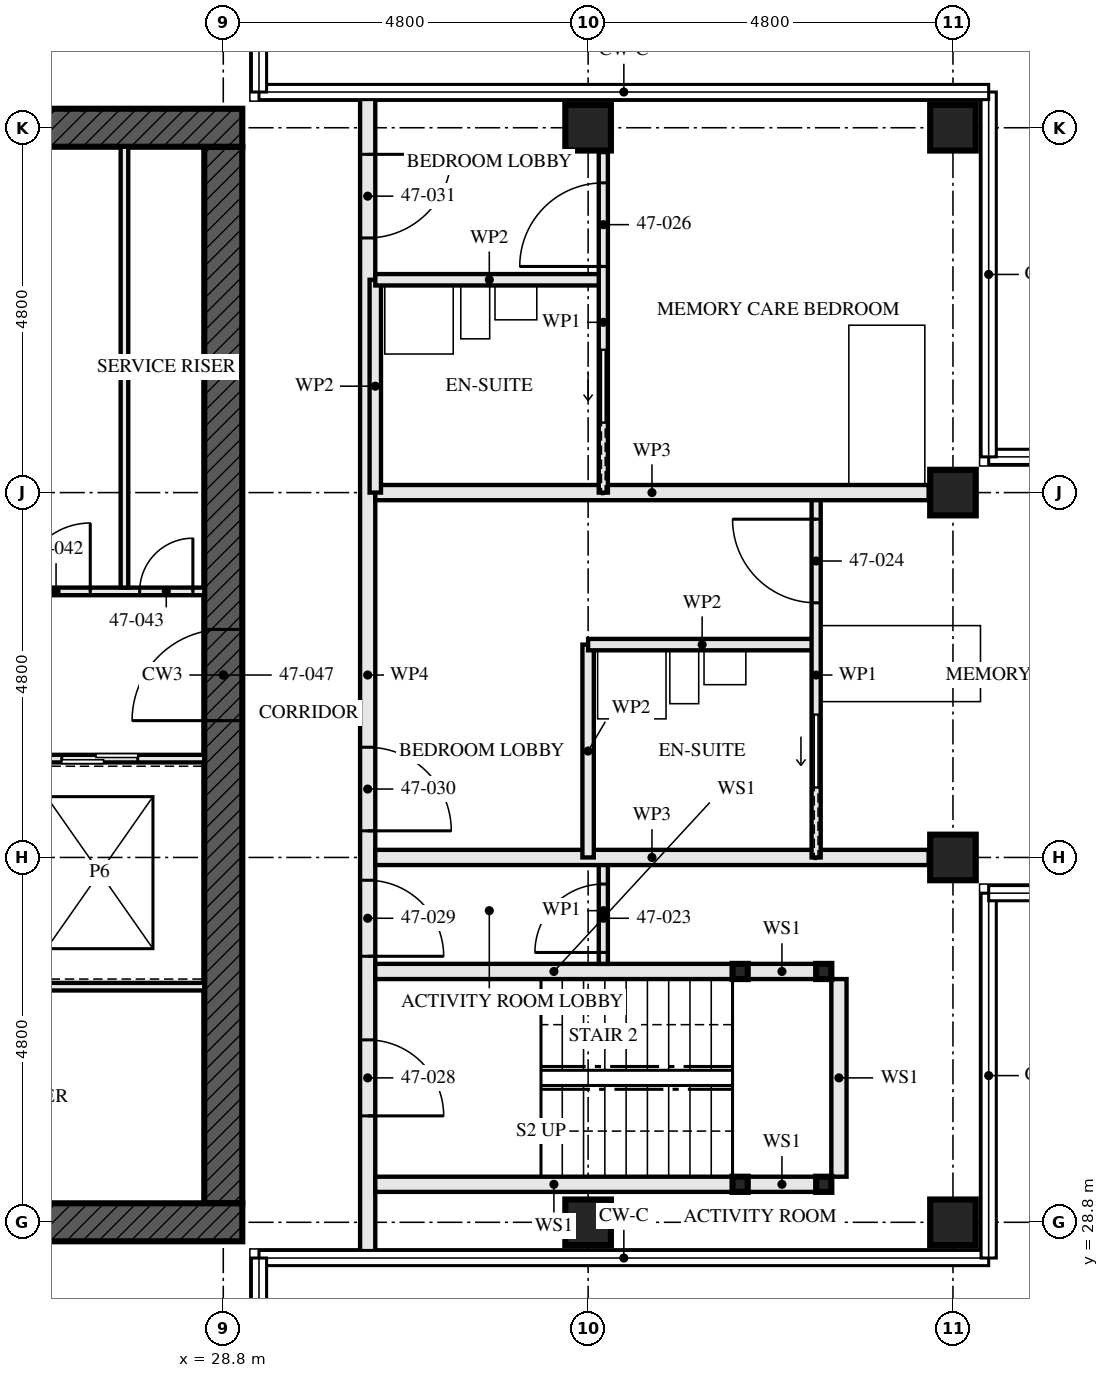
"""IFC4 building model, lengths in metres.
Left out: names, types, materials, properties, quantities, classifications, styles, units other than length and angle.
Written with IfcOpenShell. Run it as: python <this file> out.ifc"""

import sys

from ifc_helpers import new_model, si_unit, direction, frame, frame_2d, origin, origin_2d, place, context, subcontext, project, spatial, rectangle, hollow_rectangle, extrude, element, fill, save


model = new_model("IFC4")
c1 = context("Model", 3, precision=1e-05, world=origin(), true_north=direction((0.0, 1.0)))
c2 = subcontext(c1, "Body", "Model", "MODEL_VIEW")
j1 = project(units=[si_unit("LENGTHUNIT", "METRE"), si_unit("PLANEANGLEUNIT", "RADIAN")], contexts=[c1])
p1 = place(None, origin())
s1 = spatial("IfcSite", under=j1, at=p1, CompositionType="ELEMENT")
p2 = place(p1, origin())
s2 = spatial("IfcBuilding", under=s1, at=p2, CompositionType="ELEMENT")
p3 = place(p2, frame((0.0, 0.0, 172.5)))
s3 = spatial("IfcBuildingStorey", under=s2, at=p3, CompositionType="ELEMENT", Elevation=172.5)
for number, where, z_axis, x_axis in (
    (1, (33.6, 28.8, 0.0), (0.0, 0.0, 1.0), (0.0, 1.0, 0.0)),
    (2, (33.6, 43.2, 0.0), (0.0, 0.0, 1.0), (0.0, 1.0, 0.0)),
    (3, (38.4, 28.8, 0.0), (0.0, 0.0, 1.0), (0.0, 1.0, 0.0)),
    (4, (38.4, 33.6, 0.0), (0.0, 0.0, 1.0), (0.0, 1.0, 0.0)),
    (5, (38.4, 38.4, 0.0), (0.0, 0.0, 1.0), (0.0, 1.0, 0.0)),
    (6, (38.4, 43.2, 0.0), (0.0, 0.0, 1.0), (0.0, 1.0, 0.0)),
):
    element("IfcColumn", number, at=place(p3, frame(where, z_axis=z_axis, x_axis=x_axis)), inside=s3, PredefinedType="COLUMN", context=c2, shape_type="SweptSolid", body=[
        extrude(hollow_rectangle(XDim=0.6, YDim=0.6, WallThickness=0.08, at=origin_2d()), origin(), (0.0, 0.0, 1.0), 3.5),
    ])
p4 = place(p3, frame((14.15, 28.8, -0.17), z_axis=(0.0, 0.0, 1.0), x_axis=(1.0, 0.0, 0.0)))
e7 = element("IfcWall", 7, at=p4, inside=s3, PredefinedType="SHEAR", context=c2, shape_type="SweptSolid", body=[
    extrude(rectangle(XDim=14.9, YDim=0.5, at=frame_2d((7.45, 0.0))), origin(), (0.0, 0.0, 1.0), 3.5),
])
p5 = place(p4, frame((6.85, 0.0, 0.17)))
e8 = element("IfcOpeningElement", 8, at=p5, cuts=e7, PredefinedType="OPENING", context=c2, shape_type="SweptSolid", body=[
    extrude(rectangle(XDim=1.2, YDim=2.1, at=frame_2d((0.6, 1.05))), frame((0.0, 0.26, 0.0), z_axis=(0.0, -1.0, 0.0), x_axis=(1.0, 0.0, 0.0)), (0.0, 0.0, 1.0), 0.521),
])
p6 = place(p3, frame((29.05, 43.2, -0.17), z_axis=(0.0, 0.0, 1.0), x_axis=(-1.0, 0.0, 0.0)))
e9 = element("IfcWall", 9, at=p6, inside=s3, PredefinedType="SHEAR", context=c2, shape_type="SweptSolid", body=[
    extrude(rectangle(XDim=14.9, YDim=0.5, at=frame_2d((7.45, 0.0))), origin(), (0.0, 0.0, 1.0), 3.5),
])
p7 = place(p6, frame((6.85, 0.0, 0.17)))
e10 = element("IfcOpeningElement", 10, at=p7, cuts=e9, PredefinedType="OPENING", context=c2, shape_type="SweptSolid", body=[
    extrude(rectangle(XDim=1.2, YDim=2.1, at=frame_2d((0.6, 1.05))), frame((0.0, 0.26, 0.0), z_axis=(0.0, -1.0, 0.0), x_axis=(1.0, 0.0, 0.0)), (0.0, 0.0, 1.0), 0.521),
])
p8 = place(p3, frame((28.8, 29.05, -0.17), z_axis=(0.0, 0.0, 1.0), x_axis=(0.0, 1.0, 0.0)))
e11 = element("IfcWall", 11, at=p8, inside=s3, PredefinedType="SHEAR", context=c2, shape_type="SweptSolid", body=[
    extrude(rectangle(XDim=13.9, YDim=0.5, at=frame_2d((6.95, 0.0))), origin(), (0.0, 0.0, 1.0), 3.5),
])
p9 = place(p8, frame((6.35, 0.0, 0.17)))
e12 = element("IfcOpeningElement", 12, at=p9, cuts=e11, PredefinedType="OPENING", context=c2, shape_type="SweptSolid", body=[
    extrude(rectangle(XDim=1.2, YDim=2.1, at=frame_2d((0.6, 1.05))), frame((0.0, 0.26, 0.0), z_axis=(0.0, -1.0, 0.0), x_axis=(1.0, 0.0, 0.0)), (0.0, 0.0, 1.0), 0.521),
])
for number, where, z_axis, x_axis in (
    (13, (36.7, 29.3, 0.0), (0.0, 0.0, 1.0), (1.0, 0.0, 0.0)),
    (14, (36.7, 32.1, 0.0), (0.0, 0.0, 1.0), (1.0, 0.0, 0.0)),
    (15, (35.6, 29.3, 0.0), (0.0, 0.0, 1.0), (1.0, 0.0, 0.0)),
    (16, (35.6, 32.1, 0.0), (0.0, 0.0, 1.0), (1.0, 0.0, 0.0)),
):
    element("IfcColumn", number, at=place(p3, frame(where, z_axis=z_axis, x_axis=x_axis)), inside=s3, PredefinedType="COLUMN", context=c2, shape_type="SweptSolid", body=[
        extrude(hollow_rectangle(XDim=0.2, YDim=0.2, WallThickness=0.008, at=origin_2d()), origin(), (0.0, 0.0, 1.0), 3.33),
    ])
p10 = place(p3, frame((36.6, 29.3, 0.0), z_axis=(0.0, 0.0, 1.0), x_axis=(-1.0, 0.0, 0.0)))
e17 = element("IfcWall", 17, at=p10, inside=s3, PredefinedType="SOLIDWALL", context=c2, shape_type="SweptSolid", body=[
    extrude(rectangle(XDim=0.9, YDim=0.2, at=frame_2d((0.45, 0.0))), origin(), (0.0, 0.0, 1.0), 2.99),
])
p11 = place(p3, frame((35.5, 29.3, 0.0), z_axis=(0.0, 0.0, 1.0), x_axis=(-1.0, 0.0, 0.0)))
e18 = element("IfcWall", 18, at=p11, inside=s3, PredefinedType="SOLIDWALL", context=c2, shape_type="SweptSolid", body=[
    extrude(rectangle(XDim=4.7, YDim=0.2, at=frame_2d((2.35, 0.0))), origin(), (0.0, 0.0, 1.0), 2.99),
])
p12 = place(p3, frame((36.6, 32.1, 0.0), z_axis=(0.0, 0.0, 1.0), x_axis=(-1.0, 0.0, 0.0)))
e19 = element("IfcWall", 19, at=p12, inside=s3, PredefinedType="SOLIDWALL", context=c2, shape_type="SweptSolid", body=[
    extrude(rectangle(XDim=0.9, YDim=0.2, at=frame_2d((0.45, 0.0))), origin(), (0.0, 0.0, 1.0), 2.99),
])
p13 = place(p3, frame((35.5, 32.1, 0.0), z_axis=(0.0, 0.0, 1.0), x_axis=(-1.0, 0.0, 0.0)))
e20 = element("IfcWall", 20, at=p13, inside=s3, PredefinedType="SOLIDWALL", context=c2, shape_type="SweptSolid", body=[
    extrude(rectangle(XDim=4.7, YDim=0.2, at=frame_2d((2.35, 0.0))), origin(), (0.0, 0.0, 1.0), 2.99),
])
p14 = place(p3, frame((36.9, 29.4, 0.0), z_axis=(0.0, 0.0, 1.0), x_axis=(0.0, 1.0, 0.0)))
e21 = element("IfcWall", 21, at=p14, inside=s3, PredefinedType="SOLIDWALL", context=c2, shape_type="SweptSolid", body=[
    extrude(rectangle(XDim=2.6, YDim=0.2, at=frame_2d((1.3, 0.0))), origin(), (0.0, 0.0, 1.0), 3.33),
])
p15 = place(p3, frame((33.8, 32.2, 0.0), z_axis=(0.0, 0.0, 1.0), x_axis=(0.0, 1.0, 0.0)))
e22 = element("IfcWall", 22, at=p15, inside=s3, PredefinedType="PARTITIONING", context=c2, shape_type="SweptSolid", body=[
    extrude(rectangle(XDim=1.4, YDim=0.12, at=frame_2d((0.7, 0.0))), origin(), (0.0, 0.0, 1.0), 3.33),
])
p16 = place(p15, frame((0.15, 0.0, 0.0)))
e23 = element("IfcOpeningElement", 23, at=p16, cuts=e22, PredefinedType="OPENING", context=c2, shape_type="SweptSolid", body=[
    extrude(rectangle(XDim=0.9, YDim=2.1, at=frame_2d((0.45, 1.05))), frame((0.0, 0.071, 0.0), z_axis=(0.0, -1.0, 0.0), x_axis=(1.0, 0.0, 0.0)), (0.0, 0.0, 1.0), 0.141),
])
p17 = place(p3, frame((38.08, 33.6, 0.0), z_axis=(0.0, 0.0, 1.0), x_axis=(-1.0, 0.0, 0.0)))
e24 = element("IfcWall", 24, at=p17, inside=s3, PredefinedType="PARTITIONING", context=c2, shape_type="SweptSolid", body=[
    extrude(rectangle(XDim=7.28, YDim=0.2, at=frame_2d((3.64, 0.0))), origin(), (0.0, 0.0, 1.0), 2.55),
])
p18 = place(p3, frame((36.6, 36.4, 0.0), z_axis=(0.0, 0.0, 1.0), x_axis=(-1.0, 0.0, 0.0)))
e25 = element("IfcWall", 25, at=p18, inside=s3, PredefinedType="PARTITIONING", context=c2, shape_type="SweptSolid", body=[
    extrude(rectangle(XDim=3.0, YDim=0.15, at=frame_2d((1.5, 0.0))), origin(), (0.0, 0.0, 1.0), 3.33),
])
p19 = place(p3, frame((33.6, 33.6, 0.0), z_axis=(0.0, 0.0, 1.0), x_axis=(0.0, 1.0, 0.0)))
e26 = element("IfcWall", 26, at=p19, inside=s3, PredefinedType="PARTITIONING", context=c2, shape_type="SweptSolid", body=[
    extrude(rectangle(XDim=2.8, YDim=0.15, at=frame_2d((1.4, 0.0))), origin(), (0.0, 0.0, 1.0), 3.33),
])
p20 = place(p3, frame((36.6, 33.6, 0.0), z_axis=(0.0, 0.0, 1.0), x_axis=(0.0, 1.0, 0.0)))
e27 = element("IfcWall", 27, at=p20, inside=s3, PredefinedType="PARTITIONING", context=c2, shape_type="SweptSolid", body=[
    extrude(rectangle(XDim=4.8, YDim=0.12, at=frame_2d((2.4, 0.0))), origin(), (0.0, 0.0, 1.0), 3.33),
])
p21 = place(p20, frame((3.35, 0.0, 0.0)))
e28 = element("IfcOpeningElement", 28, at=p21, cuts=e27, PredefinedType="OPENING", context=c2, shape_type="SweptSolid", body=[
    extrude(rectangle(XDim=1.1, YDim=2.1, at=frame_2d((0.55, 1.05))), frame((0.0, 0.071, 0.0), z_axis=(0.0, -1.0, 0.0), x_axis=(1.0, 0.0, 0.0)), (0.0, 0.0, 1.0), 0.141),
])
p22 = place(p20, frame((0.925, 0.0, 0.0)))
e29 = element("IfcOpeningElement", 29, at=p22, cuts=e27, PredefinedType="OPENING", context=c2, shape_type="SweptSolid", body=[
    extrude(rectangle(XDim=0.95, YDim=2.1, at=frame_2d((0.475, 1.05))), frame((0.0, 0.071, 0.0), z_axis=(0.0, -1.0, 0.0), x_axis=(1.0, 0.0, 0.0)), (0.0, 0.0, 1.0), 0.141),
])
p23 = place(p3, frame((38.08, 38.4, 0.0), z_axis=(0.0, 0.0, 1.0), x_axis=(-1.0, 0.0, 0.0)))
e30 = element("IfcWall", 30, at=p23, inside=s3, PredefinedType="PARTITIONING", context=c2, shape_type="SweptSolid", body=[
    extrude(rectangle(XDim=7.28, YDim=0.2, at=frame_2d((3.64, 0.0))), origin(), (0.0, 0.0, 1.0), 2.55),
])
p24 = place(p3, frame((33.8, 41.2, 0.0), z_axis=(0.0, 0.0, 1.0), x_axis=(-1.0, 0.0, 0.0)))
e31 = element("IfcWall", 31, at=p24, inside=s3, PredefinedType="PARTITIONING", context=c2, shape_type="SweptSolid", body=[
    extrude(rectangle(XDim=3.0, YDim=0.15, at=frame_2d((1.5, 0.0))), origin(), (0.0, 0.0, 1.0), 3.33),
])
p25 = place(p3, frame((30.8, 38.4, 0.0), z_axis=(0.0, 0.0, 1.0), x_axis=(0.0, 1.0, 0.0)))
e32 = element("IfcWall", 32, at=p25, inside=s3, PredefinedType="PARTITIONING", context=c2, shape_type="SweptSolid", body=[
    extrude(rectangle(XDim=2.8, YDim=0.15, at=frame_2d((1.4, 0.0))), origin(), (0.0, 0.0, 1.0), 3.33),
])
p26 = place(p3, frame((33.8, 38.4, 0.0), z_axis=(0.0, 0.0, 1.0), x_axis=(0.0, 1.0, 0.0)))
e33 = element("IfcWall", 33, at=p26, inside=s3, PredefinedType="PARTITIONING", context=c2, shape_type="SweptSolid", body=[
    extrude(rectangle(XDim=4.48, YDim=0.12, at=frame_2d((2.24, 0.0))), origin(), (0.0, 0.0, 1.0), 3.33),
])
p27 = place(p26, frame((2.975, 0.0, 0.0)))
e34 = element("IfcOpeningElement", 34, at=p27, cuts=e33, PredefinedType="OPENING", context=c2, shape_type="SweptSolid", body=[
    extrude(rectangle(XDim=1.1, YDim=2.1, at=frame_2d((0.55, 1.05))), frame((0.0, 0.071, 0.0), z_axis=(0.0, -1.0, 0.0), x_axis=(1.0, 0.0, 0.0)), (0.0, 0.0, 1.0), 0.141),
])
p28 = place(p26, frame((0.925, 0.0, 0.0)))
e35 = element("IfcOpeningElement", 35, at=p28, cuts=e33, PredefinedType="OPENING", context=c2, shape_type="SweptSolid", body=[
    extrude(rectangle(XDim=0.95, YDim=2.1, at=frame_2d((0.475, 1.05))), frame((0.0, 0.071, 0.0), z_axis=(0.0, -1.0, 0.0), x_axis=(1.0, 0.0, 0.0)), (0.0, 0.0, 1.0), 0.141),
])
p29 = place(p3, frame((30.7, 28.35, 0.0), z_axis=(0.0, 0.0, 1.0), x_axis=(0.0, 1.0, 0.0)))
e36 = element("IfcWall", 36, at=p29, inside=s3, PredefinedType="PARTITIONING", context=c2, shape_type="SweptSolid", body=[
    extrude(rectangle(XDim=15.3, YDim=0.2, at=frame_2d((7.65, 0.0))), origin(), (0.0, 0.0, 1.0), 2.32),
])
p30 = place(p29, frame((1.85, 0.0, 0.0)))
e37 = element("IfcOpeningElement", 37, at=p30, cuts=e36, PredefinedType="OPENING", context=c2, shape_type="SweptSolid", body=[
    extrude(rectangle(XDim=1.0, YDim=2.1, at=frame_2d((0.5, 1.05))), frame((0.0, 0.111, 0.0), z_axis=(0.0, -1.0, 0.0), x_axis=(1.0, 0.0, 0.0)), (0.0, 0.0, 1.0), 0.221),
])
p31 = place(p29, frame((3.95, 0.0, 0.0)))
e38 = element("IfcOpeningElement", 38, at=p31, cuts=e36, PredefinedType="OPENING", context=c2, shape_type="SweptSolid", body=[
    extrude(rectangle(XDim=1.0, YDim=2.1, at=frame_2d((0.5, 1.05))), frame((0.0, 0.111, 0.0), z_axis=(0.0, -1.0, 0.0), x_axis=(1.0, 0.0, 0.0)), (0.0, 0.0, 1.0), 0.221),
])
p32 = place(p29, frame((5.6, 0.0, 0.0)))
e39 = element("IfcOpeningElement", 39, at=p32, cuts=e36, PredefinedType="OPENING", context=c2, shape_type="SweptSolid", body=[
    extrude(rectangle(XDim=1.1, YDim=2.1, at=frame_2d((0.55, 1.05))), frame((0.0, 0.111, 0.0), z_axis=(0.0, -1.0, 0.0), x_axis=(1.0, 0.0, 0.0)), (0.0, 0.0, 1.0), 0.221),
])
p33 = place(p29, frame((13.4, 0.0, 0.0)))
e40 = element("IfcOpeningElement", 40, at=p33, cuts=e36, PredefinedType="OPENING", context=c2, shape_type="SweptSolid", body=[
    extrude(rectangle(XDim=1.1, YDim=2.1, at=frame_2d((0.55, 1.05))), frame((0.0, 0.111, 0.0), z_axis=(0.0, -1.0, 0.0), x_axis=(1.0, 0.0, 0.0)), (0.0, 0.0, 1.0), 0.221),
])
p34 = place(p3, frame((27.5, 37.15, 0.0), z_axis=(0.0, 0.0, 1.0), x_axis=(0.0, 1.0, 0.0)))
e41 = element("IfcWall", 41, at=p34, inside=s3, PredefinedType="SOLIDWALL", context=c2, shape_type="SweptSolid", body=[
    extrude(rectangle(XDim=5.8, YDim=0.1, at=frame_2d((2.9, 0.0))), origin(), (0.0, 0.0, 1.0), 3.33),
])
p35 = place(p3, frame((23.05, 34.9, 0.0), z_axis=(0.0, 0.0, 1.0), x_axis=(1.0, 0.0, 0.0)))
e42 = element("IfcWall", 42, at=p35, inside=s3, PredefinedType="SOLIDWALL", context=c2, shape_type="SweptSolid", body=[
    extrude(rectangle(XDim=5.5, YDim=0.1, at=frame_2d((2.75, 0.0))), origin(), (0.0, 0.0, 1.0), 3.33),
])
p36 = place(p35, frame((0.85, 0.0, 0.0)))
e43 = element("IfcOpeningElement", 43, at=p36, cuts=e42, PredefinedType="OPENING", context=c2, shape_type="SweptSolid", body=[
    extrude(rectangle(XDim=1.0, YDim=2.1, at=frame_2d((0.5, 1.05))), frame((0.0, 0.061, 0.0), z_axis=(0.0, -1.0, 0.0), x_axis=(1.0, 0.0, 0.0)), (0.0, 0.0, 1.0), 0.121),
])
p37 = place(p35, frame((3.625, 0.0, 0.0)))
e44 = element("IfcOpeningElement", 44, at=p37, cuts=e42, PredefinedType="OPENING", context=c2, shape_type="SweptSolid", body=[
    extrude(rectangle(XDim=1.0, YDim=2.1, at=frame_2d((0.5, 1.05))), frame((0.0, 0.061, 0.0), z_axis=(0.0, -1.0, 0.0), x_axis=(1.0, 0.0, 0.0)), (0.0, 0.0, 1.0), 0.121),
])
p38 = place(p3, frame((22.65, 37.1, 0.0), z_axis=(0.0, 0.0, 1.0), x_axis=(1.0, 0.0, 0.0)))
e45 = element("IfcWall", 45, at=p38, inside=s3, PredefinedType="SOLIDWALL", context=c2, shape_type="SweptSolid", body=[
    extrude(rectangle(XDim=5.9, YDim=0.1, at=frame_2d((2.95, 0.0))), origin(), (0.0, 0.0, 1.0), 3.33),
])
p39 = place(p38, frame((3.5, 0.0, 0.0)))
e46 = element("IfcOpeningElement", 46, at=p39, cuts=e45, PredefinedType="OPENING", context=c2, shape_type="SweptSolid", body=[
    extrude(rectangle(XDim=0.9, YDim=2.1, at=frame_2d((0.45, 1.05))), frame((0.0, 0.061, 0.0), z_axis=(0.0, -1.0, 0.0), x_axis=(1.0, 0.0, 0.0)), (0.0, 0.0, 1.0), 0.121),
])
p40 = place(p38, frame((5.05, 0.0, 0.0)))
e47 = element("IfcOpeningElement", 47, at=p40, cuts=e45, PredefinedType="OPENING", context=c2, shape_type="SweptSolid", body=[
    extrude(rectangle(XDim=0.7, YDim=2.1, at=frame_2d((0.35, 1.05))), frame((0.0, 0.061, 0.0), z_axis=(0.0, -1.0, 0.0), x_axis=(1.0, 0.0, 0.0)), (0.0, 0.0, 1.0), 0.121),
])
p41 = place(p3, frame((23.15, 31.9, 0.0), z_axis=(0.0, 0.0, 1.0), x_axis=(1.0, 0.0, 0.0)))
e48 = element("IfcWall", 48, at=p41, inside=s3, PredefinedType="SOLIDWALL", context=c2, shape_type="SweptSolid", body=[
    extrude(rectangle(XDim=5.4, YDim=0.1, at=frame_2d((2.7, 0.0))), origin(), (0.0, 0.0, 1.0), 3.33),
])
p42 = place(p16, origin())
e49 = element("IfcDoor", 49, at=p42, inside=s3, OperationType="SINGLE_SWING_RIGHT", PredefinedType="DOOR", context=c2, shape_type="SweptSolid", body=[
    extrude(rectangle(XDim=0.9, YDim=2.1, at=frame_2d((0.45, 1.05))), frame((0.0, 0.022, 0.0), z_axis=(0.0, -1.0, 0.0), x_axis=(1.0, 0.0, 0.0)), (0.0, 0.0, 1.0), 0.044),
])
fill(e23, e49)
p43 = place(p21, origin())
e50 = element("IfcDoor", 50, at=p43, inside=s3, OperationType="SINGLE_SWING_LEFT", PredefinedType="DOOR", context=c2, shape_type="SweptSolid", body=[
    extrude(rectangle(XDim=1.1, YDim=2.1, at=frame_2d((0.55, 1.05))), frame((0.0, 0.022, 0.0), z_axis=(0.0, -1.0, 0.0), x_axis=(1.0, 0.0, 0.0)), (0.0, 0.0, 1.0), 0.044),
])
fill(e28, e50)
p44 = place(p22, origin())
e51 = element("IfcDoor", 51, at=p44, inside=s3, OperationType="SLIDING_TO_RIGHT", PredefinedType="DOOR", context=c2, shape_type="SweptSolid", body=[
    extrude(rectangle(XDim=0.95, YDim=2.1, at=frame_2d((0.475, 1.05))), frame((0.0, 0.022, 0.0), z_axis=(0.0, -1.0, 0.0), x_axis=(1.0, 0.0, 0.0)), (0.0, 0.0, 1.0), 0.044),
])
fill(e29, e51)
p45 = place(p27, origin())
e52 = element("IfcDoor", 52, at=p45, inside=s3, OperationType="SINGLE_SWING_RIGHT", PredefinedType="DOOR", context=c2, shape_type="SweptSolid", body=[
    extrude(rectangle(XDim=1.1, YDim=2.1, at=frame_2d((0.55, 1.05))), frame((0.0, 0.022, 0.0), z_axis=(0.0, -1.0, 0.0), x_axis=(1.0, 0.0, 0.0)), (0.0, 0.0, 1.0), 0.044),
])
fill(e34, e52)
p46 = place(p28, origin())
e53 = element("IfcDoor", 53, at=p46, inside=s3, OperationType="SLIDING_TO_RIGHT", PredefinedType="DOOR", context=c2, shape_type="SweptSolid", body=[
    extrude(rectangle(XDim=0.95, YDim=2.1, at=frame_2d((0.475, 1.05))), frame((0.0, 0.022, 0.0), z_axis=(0.0, -1.0, 0.0), x_axis=(1.0, 0.0, 0.0)), (0.0, 0.0, 1.0), 0.044),
])
fill(e35, e53)
p47 = place(p30, frame((1.0, 0.0, 0.0), z_axis=(0.0, 0.0, 1.0), x_axis=(-1.0, 0.0, 0.0)))
e54 = element("IfcDoor", 54, at=p47, inside=s3, OperationType="SINGLE_SWING_LEFT", PredefinedType="DOOR", context=c2, shape_type="SweptSolid", body=[
    extrude(rectangle(XDim=1.0, YDim=2.1, at=frame_2d((0.5, 1.05))), frame((0.0, 0.032, 0.0), z_axis=(0.0, -1.0, 0.0), x_axis=(1.0, 0.0, 0.0)), (0.0, 0.0, 1.0), 0.064),
])
fill(e37, e54)
p48 = place(p31, frame((1.0, 0.0, 0.0), z_axis=(0.0, 0.0, 1.0), x_axis=(-1.0, 0.0, 0.0)))
e55 = element("IfcDoor", 55, at=p48, inside=s3, OperationType="SINGLE_SWING_LEFT", PredefinedType="DOOR", context=c2, shape_type="SweptSolid", body=[
    extrude(rectangle(XDim=1.0, YDim=2.1, at=frame_2d((0.5, 1.05))), frame((0.0, 0.027, 0.0), z_axis=(0.0, -1.0, 0.0), x_axis=(1.0, 0.0, 0.0)), (0.0, 0.0, 1.0), 0.054),
])
fill(e38, e55)
p49 = place(p32, frame((1.1, 0.0, 0.0), z_axis=(0.0, 0.0, 1.0), x_axis=(-1.0, 0.0, 0.0)))
e56 = element("IfcDoor", 56, at=p49, inside=s3, OperationType="SINGLE_SWING_LEFT", PredefinedType="DOOR", context=c2, shape_type="SweptSolid", body=[
    extrude(rectangle(XDim=1.1, YDim=2.1, at=frame_2d((0.55, 1.05))), frame((0.0, 0.027, 0.0), z_axis=(0.0, -1.0, 0.0), x_axis=(1.0, 0.0, 0.0)), (0.0, 0.0, 1.0), 0.054),
])
fill(e39, e56)
p50 = place(p33, frame((1.1, 0.0, 0.0), z_axis=(0.0, 0.0, 1.0), x_axis=(-1.0, 0.0, 0.0)))
e57 = element("IfcDoor", 57, at=p50, inside=s3, OperationType="SINGLE_SWING_RIGHT", PredefinedType="DOOR", context=c2, shape_type="SweptSolid", body=[
    extrude(rectangle(XDim=1.1, YDim=2.1, at=frame_2d((0.55, 1.05))), frame((0.0, 0.027, 0.0), z_axis=(0.0, -1.0, 0.0), x_axis=(1.0, 0.0, 0.0)), (0.0, 0.0, 1.0), 0.054),
])
fill(e40, e57)
p51 = place(p37, origin())
e58 = element("IfcDoor", 58, at=p51, inside=s3, OperationType="SLIDING_TO_LEFT", PredefinedType="DOOR", context=c2, shape_type="SweptSolid", body=[
    extrude(rectangle(XDim=1.0, YDim=2.1, at=frame_2d((0.5, 1.05))), frame((0.0, 0.05, 0.0), z_axis=(0.0, -1.0, 0.0), x_axis=(1.0, 0.0, 0.0)), (0.0, 0.0, 1.0), 0.1),
])
fill(e44, e58)
p52 = place(p39, origin())
e59 = element("IfcDoor", 59, at=p52, inside=s3, OperationType="SINGLE_SWING_LEFT", PredefinedType="DOOR", context=c2, shape_type="SweptSolid", body=[
    extrude(rectangle(XDim=0.9, YDim=2.1, at=frame_2d((0.45, 1.05))), frame((0.0, 0.027, 0.0), z_axis=(0.0, -1.0, 0.0), x_axis=(1.0, 0.0, 0.0)), (0.0, 0.0, 1.0), 0.054),
])
fill(e46, e59)
p53 = place(p40, origin())
e60 = element("IfcDoor", 60, at=p53, inside=s3, OperationType="SINGLE_SWING_LEFT", PredefinedType="DOOR", context=c2, shape_type="SweptSolid", body=[
    extrude(rectangle(XDim=0.7, YDim=2.1, at=frame_2d((0.35, 1.05))), frame((0.0, 0.027, 0.0), z_axis=(0.0, -1.0, 0.0), x_axis=(1.0, 0.0, 0.0)), (0.0, 0.0, 1.0), 0.054),
])
fill(e47, e60)
p54 = place(p9, origin())
e61 = element("IfcDoor", 61, at=p54, inside=s3, OperationType="SINGLE_SWING_LEFT", PredefinedType="DOOR", context=c2, shape_type="SweptSolid", body=[
    extrude(rectangle(XDim=1.2, YDim=2.1, at=frame_2d((0.6, 1.05))), frame((0.0, 0.027, 0.0), z_axis=(0.0, -1.0, 0.0), x_axis=(1.0, 0.0, 0.0)), (0.0, 0.0, 1.0), 0.054),
])
fill(e12, e61)
save(model, sys.argv[1])
